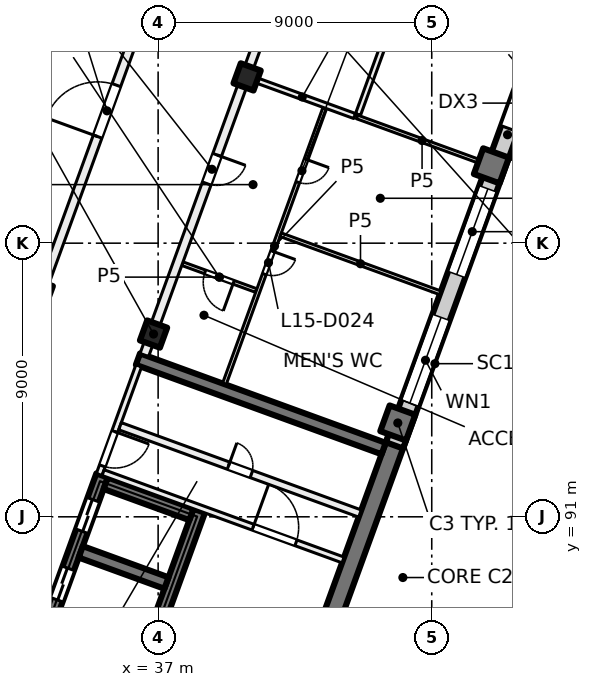
"""IFC4 building model, lengths in metres.
Left out: names, types, materials, properties, quantities, classifications, styles, units other than length and angle.
Written with IfcOpenShell. Run it as: python <this file> out.ifc"""

import sys

from ifc_helpers import new_model, si_unit, direction, frame, frame_2d, origin, origin_2d, place, context, subcontext, project, spatial, rectangle, extrude, element, fill, save


model = new_model("IFC4")
c1 = context("Model", 3, precision=1e-05, world=origin(), true_north=direction((0.0, 1.0)))
c2 = subcontext(c1, "Body", "Model", "MODEL_VIEW")
j1 = project(units=[si_unit("LENGTHUNIT", "METRE"), si_unit("PLANEANGLEUNIT", "RADIAN")], contexts=[c1])
p1 = place(None, origin())
s1 = spatial("IfcSite", under=j1, at=p1, CompositionType="ELEMENT")
p2 = place(p1, origin())
s2 = spatial("IfcBuilding", under=s1, at=p2, CompositionType="ELEMENT")
p3 = place(p2, frame((0.0, 0.0, 67.5)))
s3 = spatial("IfcBuildingStorey", under=s2, at=p3, CompositionType="ELEMENT", Elevation=67.5)
for number, where, z_axis, x_axis in (
    (1, (39.927, 105.468, 0.0), (0.0, 0.0, 1.0), (-0.342, -0.94, 0.0)),
    (2, (36.849, 97.011, 0.0), (0.0, 0.0, 1.0), (-0.342, -0.94, 0.0)),
    (3, (33.091, 98.379, 0.0), (0.0, 0.0, 1.0), (-0.342, -0.94, 0.0)),
):
    element("IfcColumn", number, at=place(p3, frame(where, z_axis=z_axis, x_axis=x_axis)), inside=s3, PredefinedType="COLUMN", context=c2, shape_type="SweptSolid", body=[
        extrude(rectangle(XDim=0.7, YDim=0.7, at=origin_2d()), origin(), (0.0, 0.0, 1.0), 4.0),
    ])
for number, where, z_axis, x_axis in (
    (4, (47.962, 102.544, 0.0), (0.0, 0.0, 1.0), (-0.342, -0.94, 0.0)),
    (5, (44.884, 94.087, 0.0), (0.0, 0.0, 1.0), (-0.342, -0.94, 0.0)),
):
    element("IfcColumn", number, at=place(p3, frame(where, z_axis=z_axis, x_axis=x_axis)), inside=s3, PredefinedType="COLUMN", context=c2, shape_type="SweptSolid", body=[
        extrude(rectangle(XDim=0.9, YDim=0.9, at=origin_2d()), origin(), (0.0, 0.0, 1.0), 4.0),
    ])
p4 = place(p3, frame((41.827, 85.249, 0.0), z_axis=(0.0, 0.0, 1.0), x_axis=(0.342016162452, 0.939694069696, 0.0)))
e6 = element("IfcWall", 6, at=p4, inside=s3, PredefinedType="SHEAR", context=c2, shape_type="SweptSolid", body=[
    extrude(rectangle(XDim=8.9, YDim=0.6, at=frame_2d((4.45, 0.0))), origin(), (0.0, 0.0, 1.0), 4.0),
])
p5 = place(p3, frame((30.984, 80.895, 0.0), z_axis=(0.0, 0.0, 1.0), x_axis=(0.342021021735, 0.939692301071, 0.0)))
e7 = element("IfcWall", 7, at=p5, inside=s3, PredefinedType="SHEAR", context=c2, shape_type="SweptSolid", body=[
    extrude(rectangle(XDim=12.2, YDim=0.4, at=frame_2d((6.1, 0.0))), origin(), (0.0, 0.0, 1.0), 4.0),
])
p6 = place(p5, frame((5.45, 0.0, 0.0)))
e8 = element("IfcOpeningElement", 8, at=p6, cuts=e7, PredefinedType="OPENING", context=c2, shape_type="SweptSolid", body=[
    extrude(rectangle(XDim=1.1, YDim=2.1, at=frame_2d((0.55, 1.05))), frame((0.0, 0.21, 0.0), z_axis=(0.0, -1.0, 0.0), x_axis=(1.0, 0.0, 0.0)), (0.0, 0.0, 1.0), 0.42),
])
p7 = place(p5, frame((7.85, 0.0, 0.0)))
e9 = element("IfcOpeningElement", 9, at=p7, cuts=e7, PredefinedType="OPENING", context=c2, shape_type="SweptSolid", body=[
    extrude(rectangle(XDim=1.1, YDim=2.1, at=frame_2d((0.55, 1.05))), frame((0.0, 0.21, 0.0), z_axis=(0.0, -1.0, 0.0), x_axis=(1.0, 0.0, 0.0)), (0.0, 0.0, 1.0), 0.42),
])
p8 = place(p5, frame((10.25, 0.0, 0.0)))
e10 = element("IfcOpeningElement", 10, at=p8, cuts=e7, PredefinedType="OPENING", context=c2, shape_type="SweptSolid", body=[
    extrude(rectangle(XDim=1.1, YDim=2.1, at=frame_2d((0.55, 1.05))), frame((0.0, 0.21, 0.0), z_axis=(0.0, -1.0, 0.0), x_axis=(1.0, 0.0, 0.0)), (0.0, 0.0, 1.0), 0.42),
])
p9 = place(p3, frame((34.178, 79.732, 0.0), z_axis=(0.0, 0.0, 1.0), x_axis=(0.342014590177, 0.939694641948, 0.0)))
e11 = element("IfcWall", 11, at=p9, inside=s3, PredefinedType="SHEAR", context=c2, shape_type="SweptSolid", body=[
    extrude(rectangle(XDim=12.2, YDim=0.4, at=frame_2d((6.1, 0.0))), origin(), (0.0, 0.0, 1.0), 4.0),
])
p10 = place(p3, frame((37.274, 88.822, 0.0), z_axis=(0.0, 0.0, 1.0), x_axis=(-0.939686455819, 0.342037080957, 0.0)))
e12 = element("IfcWall", 12, at=p10, inside=s3, PredefinedType="SHEAR", context=c2, shape_type="SweptSolid", body=[
    extrude(rectangle(XDim=3.0, YDim=0.4, at=frame_2d((1.5, 0.0))), origin(), (0.0, 0.0, 1.0), 4.0),
])
p11 = place(p3, frame((38.095, 91.077, 0.0), z_axis=(0.0, 0.0, 1.0), x_axis=(-0.939676934218, 0.342063238742, 0.0)))
e13 = element("IfcWall", 13, at=p11, inside=s3, PredefinedType="SHEAR", context=c2, shape_type="SweptSolid", body=[
    extrude(rectangle(XDim=3.0, YDim=0.4, at=frame_2d((1.5, 0.0))), origin(), (0.0, 0.0, 1.0), 4.0),
])
p12 = place(p3, frame((44.418, 93.245, 0.0), z_axis=(0.0, 0.0, 1.0), x_axis=(-0.93969060187, 0.342025690201, 0.0)))
e14 = element("IfcWall", 14, at=p12, inside=s3, PredefinedType="SHEAR", context=c2, shape_type="SweptSolid", body=[
    extrude(rectangle(XDim=8.6, YDim=0.4, at=frame_2d((4.3, 0.0))), origin(), (0.0, 0.0, 1.0), 4.0),
])
p13 = place(p3, frame((52.212, 113.783, 0.0), z_axis=(0.0, 0.0, 1.0), x_axis=(-0.34202521188, -0.939690775968, 0.0)))
e15 = element("IfcWall", 15, at=p13, inside=s3, PredefinedType="SOLIDWALL", context=c2, shape_type="SweptSolid", body=[
    extrude(rectangle(XDim=21.745, YDim=0.6, at=frame_2d((10.873, 0.0))), origin(), (0.0, 0.0, 1.0), 3.625),
])
p14 = place(p13, frame((3.765, 0.0, 0.9)))
e16 = element("IfcOpeningElement", 16, at=p14, cuts=e15, PredefinedType="OPENING", context=c2, shape_type="SweptSolid", body=[
    extrude(rectangle(XDim=3.0, YDim=2.4, at=frame_2d((1.5, 1.2))), frame((0.0, 0.31, 0.0), z_axis=(0.0, -1.0, 0.0), x_axis=(1.0, 0.0, 0.0)), (0.0, 0.0, 1.0), 0.62),
])
p15 = place(p13, frame((8.865, 0.0, 0.0)))
e17 = element("IfcOpeningElement", 17, at=p15, cuts=e15, PredefinedType="OPENING", context=c2, shape_type="SweptSolid", body=[
    extrude(rectangle(XDim=1.8, YDim=2.4, at=frame_2d((0.9, 1.2))), frame((0.0, 0.31, 0.0), z_axis=(0.0, -1.0, 0.0), x_axis=(1.0, 0.0, 0.0)), (0.0, 0.0, 1.0), 0.62),
])
p16 = place(p13, frame((12.765, 0.0, 0.9)))
e18 = element("IfcOpeningElement", 18, at=p16, cuts=e15, PredefinedType="OPENING", context=c2, shape_type="SweptSolid", body=[
    extrude(rectangle(XDim=3.0, YDim=2.4, at=frame_2d((1.5, 1.2))), frame((0.0, 0.31, 0.0), z_axis=(0.0, -1.0, 0.0), x_axis=(1.0, 0.0, 0.0)), (0.0, 0.0, 1.0), 0.62),
])
p17 = place(p13, frame((17.265, 0.0, 0.9)))
e19 = element("IfcOpeningElement", 19, at=p17, cuts=e15, PredefinedType="OPENING", context=c2, shape_type="SweptSolid", body=[
    extrude(rectangle(XDim=3.0, YDim=2.4, at=frame_2d((1.5, 1.2))), frame((0.0, 0.31, 0.0), z_axis=(0.0, -1.0, 0.0), x_axis=(1.0, 0.0, 0.0)), (0.0, 0.0, 1.0), 0.62),
])
p18 = place(p3, frame((24.666, 100.669, 0.0), z_axis=(0.0, 0.0, 1.0), x_axis=(0.34201964167, 0.939692803373, 0.0)))
e20 = element("IfcWall", 20, at=p18, inside=s3, PredefinedType="SOLIDWALL", context=c2, shape_type="SweptSolid", body=[
    extrude(rectangle(XDim=32.884, YDim=0.6, at=frame_2d((16.442, 0.0))), origin(), (0.0, 0.0, 1.0), 3.625),
])
p19 = place(p18, frame((1.48, 0.0, 0.9)))
e21 = element("IfcOpeningElement", 21, at=p19, cuts=e20, PredefinedType="OPENING", context=c2, shape_type="SweptSolid", body=[
    extrude(rectangle(XDim=3.0, YDim=2.4, at=frame_2d((1.5, 1.2))), frame((0.0, 0.31, 0.0), z_axis=(0.0, -1.0, 0.0), x_axis=(1.0, 0.0, 0.0)), (0.0, 0.0, 1.0), 0.62),
])
p20 = place(p18, frame((5.98, 0.0, 0.9)))
e22 = element("IfcOpeningElement", 22, at=p20, cuts=e20, PredefinedType="OPENING", context=c2, shape_type="SweptSolid", body=[
    extrude(rectangle(XDim=3.0, YDim=2.4, at=frame_2d((1.5, 1.2))), frame((0.0, 0.31, 0.0), z_axis=(0.0, -1.0, 0.0), x_axis=(1.0, 0.0, 0.0)), (0.0, 0.0, 1.0), 0.62),
])
p21 = place(p18, frame((11.08, 0.0, 0.0)))
e23 = element("IfcOpeningElement", 23, at=p21, cuts=e20, PredefinedType="OPENING", context=c2, shape_type="SweptSolid", body=[
    extrude(rectangle(XDim=1.8, YDim=2.4, at=frame_2d((0.9, 1.2))), frame((0.0, 0.31, 0.0), z_axis=(0.0, -1.0, 0.0), x_axis=(1.0, 0.0, 0.0)), (0.0, 0.0, 1.0), 0.62),
])
p22 = place(p18, frame((14.98, 0.0, 0.9)))
e24 = element("IfcOpeningElement", 24, at=p22, cuts=e20, PredefinedType="OPENING", context=c2, shape_type="SweptSolid", body=[
    extrude(rectangle(XDim=3.0, YDim=2.4, at=frame_2d((1.5, 1.2))), frame((0.0, 0.31, 0.0), z_axis=(0.0, -1.0, 0.0), x_axis=(1.0, 0.0, 0.0)), (0.0, 0.0, 1.0), 0.62),
])
p23 = place(p18, frame((19.48, 0.0, 0.9)))
e25 = element("IfcOpeningElement", 25, at=p23, cuts=e20, PredefinedType="OPENING", context=c2, shape_type="SweptSolid", body=[
    extrude(rectangle(XDim=3.0, YDim=2.4, at=frame_2d((1.5, 1.2))), frame((0.0, 0.31, 0.0), z_axis=(0.0, -1.0, 0.0), x_axis=(1.0, 0.0, 0.0)), (0.0, 0.0, 1.0), 0.62),
])
p24 = place(p18, frame((24.58, 0.0, 0.0)))
e26 = element("IfcOpeningElement", 26, at=p24, cuts=e20, PredefinedType="OPENING", context=c2, shape_type="SweptSolid", body=[
    extrude(rectangle(XDim=1.8, YDim=2.4, at=frame_2d((0.9, 1.2))), frame((0.0, 0.31, 0.0), z_axis=(0.0, -1.0, 0.0), x_axis=(1.0, 0.0, 0.0)), (0.0, 0.0, 1.0), 0.62),
])
p25 = place(p18, frame((28.48, 0.0, 0.9)))
e27 = element("IfcOpeningElement", 27, at=p25, cuts=e20, PredefinedType="OPENING", context=c2, shape_type="SweptSolid", body=[
    extrude(rectangle(XDim=3.0, YDim=2.4, at=frame_2d((1.5, 1.2))), frame((0.0, 0.31, 0.0), z_axis=(0.0, -1.0, 0.0), x_axis=(1.0, 0.0, 0.0)), (0.0, 0.0, 1.0), 0.62),
])
p26 = place(p3, frame((36.362, 95.964, 0.0), z_axis=(0.0, 0.0, 1.0), x_axis=(-0.341995824804, -0.939701471648, 0.0)))
e28 = element("IfcWall", 28, at=p26, inside=s3, PredefinedType="PARTITIONING", context=c2, shape_type="SweptSolid", body=[
    extrude(rectangle(XDim=3.8, YDim=0.2, at=frame_2d((1.9, 0.0))), origin(), (0.0, 0.0, 1.0), 3.625),
])
p27 = place(p26, frame((2.3, 0.0, 0.0)))
e29 = element("IfcOpeningElement", 29, at=p27, cuts=e28, PredefinedType="OPENING", context=c2, shape_type="SweptSolid", body=[
    extrude(rectangle(XDim=1.2, YDim=2.1, at=frame_2d((0.6, 1.05))), frame((0.0, 0.11, 0.0), z_axis=(0.0, -1.0, 0.0), x_axis=(1.0, 0.0, 0.0)), (0.0, 0.0, 1.0), 0.22),
])
p28 = place(p3, frame((35.19, 92.453, 0.0), z_axis=(0.0, 0.0, 1.0), x_axis=(0.939691552312, -0.342023078919, 0.0)))
e30 = element("IfcWall", 30, at=p28, inside=s3, PredefinedType="PARTITIONING", context=c2, shape_type="SweptSolid", body=[
    extrude(rectangle(XDim=8.4, YDim=0.2, at=frame_2d((4.2, 0.0))), origin(), (0.0, 0.0, 1.0), 3.625),
])
p29 = place(p28, frame((5.25, 0.0, 0.0)))
e31 = element("IfcOpeningElement", 31, at=p29, cuts=e30, PredefinedType="OPENING", context=c2, shape_type="SweptSolid", body=[
    extrude(rectangle(XDim=1.5, YDim=2.1, at=frame_2d((0.75, 1.05))), frame((0.0, 0.11, 0.0), z_axis=(0.0, -1.0, 0.0), x_axis=(1.0, 0.0, 0.0)), (0.0, 0.0, 1.0), 0.22),
])
p30 = place(p3, frame((35.746, 93.98, 0.0), z_axis=(0.0, 0.0, 1.0), x_axis=(0.939691552312, -0.342023078919, 0.0)))
e32 = element("IfcWall", 32, at=p30, inside=s3, PredefinedType="PARTITIONING", context=c2, shape_type="SweptSolid", body=[
    extrude(rectangle(XDim=8.4, YDim=0.25, at=frame_2d((4.2, 0.0))), origin(), (0.0, 0.0, 1.0), 3.625),
])
p31 = place(p30, frame((3.8, 0.0, 0.0)))
e33 = element("IfcOpeningElement", 33, at=p31, cuts=e32, PredefinedType="OPENING", context=c2, shape_type="SweptSolid", body=[
    extrude(rectangle(XDim=0.8, YDim=2.1, at=frame_2d((0.4, 1.05))), frame((0.0, 0.135, 0.0), z_axis=(0.0, -1.0, 0.0), x_axis=(1.0, 0.0, 0.0)), (0.0, 0.0, 1.0), 0.27),
])
p32 = place(p3, frame((32.881, 97.657, 0.0), z_axis=(0.0, 0.0, 1.0), x_axis=(0.342017360004, 0.939693633828, 0.0)))
e34 = element("IfcWall", 34, at=p32, inside=s3, PredefinedType="PARTITIONING", context=c2, shape_type="SweptSolid", body=[
    extrude(rectangle(XDim=34.516, YDim=0.3, at=frame_2d((17.258, 0.0))), origin(), (0.0, 0.0, 1.0), 3.625),
])
p33 = place(p32, frame((6.225, 0.0, 0.0)))
e35 = element("IfcOpeningElement", 35, at=p33, cuts=e34, PredefinedType="OPENING", context=c2, shape_type="SweptSolid", body=[
    extrude(rectangle(XDim=1.8, YDim=2.1, at=frame_2d((0.9, 1.05))), frame((0.0, 0.16, 0.0), z_axis=(0.0, -1.0, 0.0), x_axis=(1.0, 0.0, 0.0)), (0.0, 0.0, 1.0), 0.32),
])
p34 = place(p32, frame((15.9, 0.0, 0.0)))
e36 = element("IfcOpeningElement", 36, at=p34, cuts=e34, PredefinedType="OPENING", context=c2, shape_type="SweptSolid", body=[
    extrude(rectangle(XDim=1.2, YDim=2.1, at=frame_2d((0.6, 1.05))), frame((0.0, 0.16, 0.0), z_axis=(0.0, -1.0, 0.0), x_axis=(1.0, 0.0, 0.0)), (0.0, 0.0, 1.0), 0.32),
])
p35 = place(p32, frame((20.5, 0.0, 0.0)))
e37 = element("IfcOpeningElement", 37, at=p35, cuts=e34, PredefinedType="OPENING", context=c2, shape_type="SweptSolid", body=[
    extrude(rectangle(XDim=1.0, YDim=2.1, at=frame_2d((0.5, 1.05))), frame((0.0, 0.16, 0.0), z_axis=(0.0, -1.0, 0.0), x_axis=(1.0, 0.0, 0.0)), (0.0, 0.0, 1.0), 0.32),
])
p36 = place(p32, frame((25.0, 0.0, 0.0)))
e38 = element("IfcOpeningElement", 38, at=p36, cuts=e34, PredefinedType="OPENING", context=c2, shape_type="SweptSolid", body=[
    extrude(rectangle(XDim=1.0, YDim=2.1, at=frame_2d((0.5, 1.05))), frame((0.0, 0.16, 0.0), z_axis=(0.0, -1.0, 0.0), x_axis=(1.0, 0.0, 0.0)), (0.0, 0.0, 1.0), 0.32),
])
p37 = place(p32, frame((30.562, 0.0, 0.0)))
e39 = element("IfcOpeningElement", 39, at=p37, cuts=e34, PredefinedType="OPENING", context=c2, shape_type="SweptSolid", body=[
    extrude(rectangle(XDim=1.0, YDim=2.1, at=frame_2d((0.5, 1.05))), frame((0.0, 0.16, 0.0), z_axis=(0.0, -1.0, 0.0), x_axis=(1.0, 0.0, 0.0)), (0.0, 0.0, 1.0), 0.32),
])
p38 = place(p3, frame((40.229, 98.441, 0.0), z_axis=(0.0, 0.0, 1.0), x_axis=(-0.939663852573, 0.342099173001, 0.0)))
e40 = element("IfcWall", 40, at=p38, inside=s3, PredefinedType="PARTITIONING", context=c2, shape_type="SweptSolid", body=[
    extrude(rectangle(XDim=2.587, YDim=0.125, at=frame_2d((1.293, 0.0))), origin(), (0.0, 0.0, 1.0), 3.625),
])
p39 = place(p38, frame((0.794, 0.0, 0.0)))
e41 = element("IfcOpeningElement", 41, at=p39, cuts=e40, PredefinedType="OPENING", context=c2, shape_type="SweptSolid", body=[
    extrude(rectangle(XDim=1.0, YDim=2.1, at=frame_2d((0.5, 1.05))), frame((0.0, 0.073, 0.0), z_axis=(0.0, -1.0, 0.0), x_axis=(1.0, 0.0, 0.0)), (0.0, 0.0, 1.0), 0.145),
])
p40 = place(p3, frame((42.482, 104.446, 0.0), z_axis=(0.0, 0.0, 1.0), x_axis=(-0.342025030348, -0.939690842041, 0.0)))
e42 = element("IfcWall", 42, at=p40, inside=s3, PredefinedType="PARTITIONING", context=c2, shape_type="SweptSolid", body=[
    extrude(rectangle(XDim=9.663, YDim=0.125, at=frame_2d((4.832, 0.0))), origin(), (0.0, 0.0, 1.0), 3.625),
])
p41 = place(p40, frame((1.797, 0.0, 0.0)))
e43 = element("IfcOpeningElement", 43, at=p41, cuts=e42, PredefinedType="OPENING", context=c2, shape_type="SweptSolid", body=[
    extrude(rectangle(XDim=0.8, YDim=2.1, at=frame_2d((0.4, 1.05))), frame((0.0, 0.073, 0.0), z_axis=(0.0, -1.0, 0.0), x_axis=(1.0, 0.0, 0.0)), (0.0, 0.0, 1.0), 0.145),
])
p42 = place(p40, frame((5.015, 0.0, 0.0)))
e44 = element("IfcOpeningElement", 44, at=p42, cuts=e42, PredefinedType="OPENING", context=c2, shape_type="SweptSolid", body=[
    extrude(rectangle(XDim=0.8, YDim=2.1, at=frame_2d((0.4, 1.05))), frame((0.0, 0.073, 0.0), z_axis=(0.0, -1.0, 0.0), x_axis=(1.0, 0.0, 0.0)), (0.0, 0.0, 1.0), 0.145),
])
p43 = place(p3, frame((40.021, 105.434, 0.0), z_axis=(0.0, 0.0, 1.0), x_axis=(0.939740864669, -0.341887565249, 0.0)))
e45 = element("IfcWall", 45, at=p43, inside=s3, PredefinedType="PARTITIONING", context=c2, shape_type="SweptSolid", body=[
    extrude(rectangle(XDim=3.663, YDim=0.175, at=frame_2d((1.831, 0.0))), origin(), (0.0, 0.0, 1.0), 3.625),
])
p44 = place(p3, frame((41.031, 100.278, 0.0), z_axis=(0.0, 0.0, 1.0), x_axis=(0.939696437289, -0.342009657388, 0.0)))
e46 = element("IfcWall", 46, at=p44, inside=s3, PredefinedType="PARTITIONING", context=c2, shape_type="SweptSolid", body=[
    extrude(rectangle(XDim=5.588, YDim=0.125, at=frame_2d((2.794, 0.0))), origin(), (0.0, 0.0, 1.0), 3.625),
])
p45 = place(p3, frame((43.542, 104.153, 0.0), z_axis=(0.0, 0.0, 1.0), x_axis=(0.939646198652, -0.34214766017, 0.0)))
e47 = element("IfcWall", 47, at=p45, inside=s3, PredefinedType="PARTITIONING", context=c2, shape_type="SweptSolid", body=[
    extrude(rectangle(XDim=4.554, YDim=0.125, at=frame_2d((2.277, 0.0))), origin(), (0.0, 0.0, 1.0), 3.625),
])
p46 = place(p3, frame((44.612, 118.483, 0.0), z_axis=(0.0, 0.0, 1.0), x_axis=(-0.342043123066, -0.939684256526, 0.0)))
e48 = element("IfcWall", 48, at=p46, inside=s3, PredefinedType="PARTITIONING", context=c2, shape_type="SweptSolid", body=[
    extrude(rectangle(XDim=23.582, YDim=0.3, at=frame_2d((11.791, 0.0))), origin(), (0.0, 0.0, 1.0), 3.625),
])
p47 = place(p46, frame((16.583, 0.0, 0.0)))
e49 = element("IfcOpeningElement", 49, at=p47, cuts=e48, PredefinedType="OPENING", context=c2, shape_type="SweptSolid", body=[
    extrude(rectangle(XDim=1.0, YDim=2.1, at=frame_2d((0.5, 1.05))), frame((0.0, 0.16, 0.0), z_axis=(0.0, -1.0, 0.0), x_axis=(1.0, 0.0, 0.0)), (0.0, 0.0, 1.0), 0.32),
])
p48 = place(p46, frame((10.982, 0.0, 0.0)))
e50 = element("IfcOpeningElement", 50, at=p48, cuts=e48, PredefinedType="OPENING", context=c2, shape_type="SweptSolid", body=[
    extrude(rectangle(XDim=1.2, YDim=2.1, at=frame_2d((0.6, 1.05))), frame((0.0, 0.16, 0.0), z_axis=(0.0, -1.0, 0.0), x_axis=(1.0, 0.0, 0.0)), (0.0, 0.0, 1.0), 0.32),
])
p49 = place(p46, frame((5.756, 0.0, 0.0)))
e51 = element("IfcOpeningElement", 51, at=p49, cuts=e48, PredefinedType="OPENING", context=c2, shape_type="SweptSolid", body=[
    extrude(rectangle(XDim=1.8, YDim=2.1, at=frame_2d((0.9, 1.05))), frame((0.0, 0.16, 0.0), z_axis=(0.0, -1.0, 0.0), x_axis=(1.0, 0.0, 0.0)), (0.0, 0.0, 1.0), 0.32),
])
p50 = place(p3, frame((45.114, 108.462, 0.0), z_axis=(0.0, 0.0, 1.0), x_axis=(-0.342056723843, -0.93967930576, 0.0)))
e52 = element("IfcWall", 52, at=p50, inside=s3, PredefinedType="PARTITIONING", context=c2, shape_type="SweptSolid", body=[
    extrude(rectangle(XDim=4.5, YDim=0.175, at=frame_2d((2.25, 0.0))), origin(), (0.0, 0.0, 1.0), 3.625),
])
p51 = place(p15, origin())
e53 = element("IfcDoor", 53, at=p51, inside=s3, OperationType="DOUBLE_DOOR_SINGLE_SWING", PredefinedType="DOOR", context=c2, shape_type="SweptSolid", body=[
    extrude(rectangle(XDim=1.8, YDim=2.4, at=frame_2d((0.9, 1.2))), frame((0.0, 0.025, 0.0), z_axis=(0.0, -1.0, 0.0), x_axis=(1.0, 0.0, 0.0)), (0.0, 0.0, 1.0), 0.05),
])
fill(e17, e53)
p52 = place(p16, origin())
e54 = element("IfcWindow", 54, at=p52, inside=s3, PartitioningType="SINGLE_PANEL", PredefinedType="WINDOW", context=c2, shape_type="SweptSolid", body=[
    extrude(rectangle(XDim=3.0, YDim=2.4, at=frame_2d((1.5, 1.2))), frame((0.0, 0.03, 0.0), z_axis=(0.0, -1.0, 0.0), x_axis=(1.0, 0.0, 0.0)), (0.0, 0.0, 1.0), 0.06),
])
fill(e18, e54)
p53 = place(p17, origin())
e55 = element("IfcWindow", 55, at=p53, inside=s3, PartitioningType="SINGLE_PANEL", PredefinedType="WINDOW", context=c2, shape_type="SweptSolid", body=[
    extrude(rectangle(XDim=3.0, YDim=2.4, at=frame_2d((1.5, 1.2))), frame((0.0, 0.03, 0.0), z_axis=(0.0, -1.0, 0.0), x_axis=(1.0, 0.0, 0.0)), (0.0, 0.0, 1.0), 0.06),
])
fill(e19, e55)
p54 = place(p7, origin())
e56 = element("IfcDoor", 56, at=p54, inside=s3, OperationType="DOUBLE_DOOR_SLIDING", PredefinedType="DOOR", context=c2, shape_type="SweptSolid", body=[
    extrude(rectangle(XDim=1.1, YDim=2.1, at=frame_2d((0.55, 1.05))), frame((0.0, 0.025, 0.0), z_axis=(0.0, -1.0, 0.0), x_axis=(1.0, 0.0, 0.0)), (0.0, 0.0, 1.0), 0.05),
])
fill(e9, e56)
p55 = place(p8, origin())
e57 = element("IfcDoor", 57, at=p55, inside=s3, OperationType="DOUBLE_DOOR_SLIDING", PredefinedType="DOOR", context=c2, shape_type="SweptSolid", body=[
    extrude(rectangle(XDim=1.1, YDim=2.1, at=frame_2d((0.55, 1.05))), frame((0.0, 0.025, 0.0), z_axis=(0.0, -1.0, 0.0), x_axis=(1.0, 0.0, 0.0)), (0.0, 0.0, 1.0), 0.05),
])
fill(e10, e57)
p56 = place(p27, origin())
e58 = element("IfcDoor", 58, at=p56, inside=s3, OperationType="DOUBLE_DOOR_SINGLE_SWING", PredefinedType="DOOR", context=c2, shape_type="SweptSolid", body=[
    extrude(rectangle(XDim=1.2, YDim=2.1, at=frame_2d((0.6, 1.05))), frame((0.0, 0.025, 0.0), z_axis=(0.0, -1.0, 0.0), x_axis=(1.0, 0.0, 0.0)), (0.0, 0.0, 1.0), 0.05),
])
fill(e29, e58)
p57 = place(p29, origin())
e59 = element("IfcDoor", 59, at=p57, inside=s3, OperationType="DOUBLE_DOOR_SINGLE_SWING", PredefinedType="DOOR", context=c2, shape_type="SweptSolid", body=[
    extrude(rectangle(XDim=1.5, YDim=2.1, at=frame_2d((0.75, 1.05))), frame((0.0, 0.025, 0.0), z_axis=(0.0, -1.0, 0.0), x_axis=(1.0, 0.0, 0.0)), (0.0, 0.0, 1.0), 0.05),
])
fill(e31, e59)
p58 = place(p31, origin())
e60 = element("IfcDoor", 60, at=p58, inside=s3, OperationType="SINGLE_SWING_RIGHT", PredefinedType="DOOR", context=c2, shape_type="SweptSolid", body=[
    extrude(rectangle(XDim=0.8, YDim=2.1, at=frame_2d((0.4, 1.05))), frame((0.0, 0.025, 0.0), z_axis=(0.0, -1.0, 0.0), x_axis=(1.0, 0.0, 0.0)), (0.0, 0.0, 1.0), 0.05),
])
fill(e33, e60)
p59 = place(p33, origin())
e61 = element("IfcDoor", 61, at=p59, inside=s3, OperationType="DOUBLE_DOOR_SINGLE_SWING", PredefinedType="DOOR", context=c2, shape_type="SweptSolid", body=[
    extrude(rectangle(XDim=1.8, YDim=2.1, at=frame_2d((0.9, 1.05))), frame((0.0, 0.025, 0.0), z_axis=(0.0, -1.0, 0.0), x_axis=(1.0, 0.0, 0.0)), (0.0, 0.0, 1.0), 0.05),
])
fill(e35, e61)
p60 = place(p47, origin())
e62 = element("IfcDoor", 62, at=p60, inside=s3, OperationType="SINGLE_SWING_LEFT", PredefinedType="DOOR", context=c2, shape_type="SweptSolid", body=[
    extrude(rectangle(XDim=1.0, YDim=2.1, at=frame_2d((0.5, 1.05))), frame((0.0, 0.025, 0.0), z_axis=(0.0, -1.0, 0.0), x_axis=(1.0, 0.0, 0.0)), (0.0, 0.0, 1.0), 0.05),
])
fill(e49, e62)
p61 = place(p39, origin())
e63 = element("IfcDoor", 63, at=p61, inside=s3, OperationType="SINGLE_SWING_RIGHT", PredefinedType="DOOR", context=c2, shape_type="SweptSolid", body=[
    extrude(rectangle(XDim=1.0, YDim=2.1, at=frame_2d((0.5, 1.05))), frame((0.0, 0.025, 0.0), z_axis=(0.0, -1.0, 0.0), x_axis=(1.0, 0.0, 0.0)), (0.0, 0.0, 1.0), 0.05),
])
fill(e41, e63)
p62 = place(p41, origin())
e64 = element("IfcDoor", 64, at=p62, inside=s3, OperationType="SINGLE_SWING_RIGHT", PredefinedType="DOOR", context=c2, shape_type="SweptSolid", body=[
    extrude(rectangle(XDim=0.8, YDim=2.1, at=frame_2d((0.4, 1.05))), frame((0.0, 0.025, 0.0), z_axis=(0.0, -1.0, 0.0), x_axis=(1.0, 0.0, 0.0)), (0.0, 0.0, 1.0), 0.05),
])
fill(e43, e64)
p63 = place(p42, origin())
e65 = element("IfcDoor", 65, at=p63, inside=s3, OperationType="SINGLE_SWING_LEFT", PredefinedType="DOOR", context=c2, shape_type="SweptSolid", body=[
    extrude(rectangle(XDim=0.8, YDim=2.1, at=frame_2d((0.4, 1.05))), frame((0.0, 0.025, 0.0), z_axis=(0.0, -1.0, 0.0), x_axis=(1.0, 0.0, 0.0)), (0.0, 0.0, 1.0), 0.05),
])
fill(e44, e65)
save(model, sys.argv[1])
